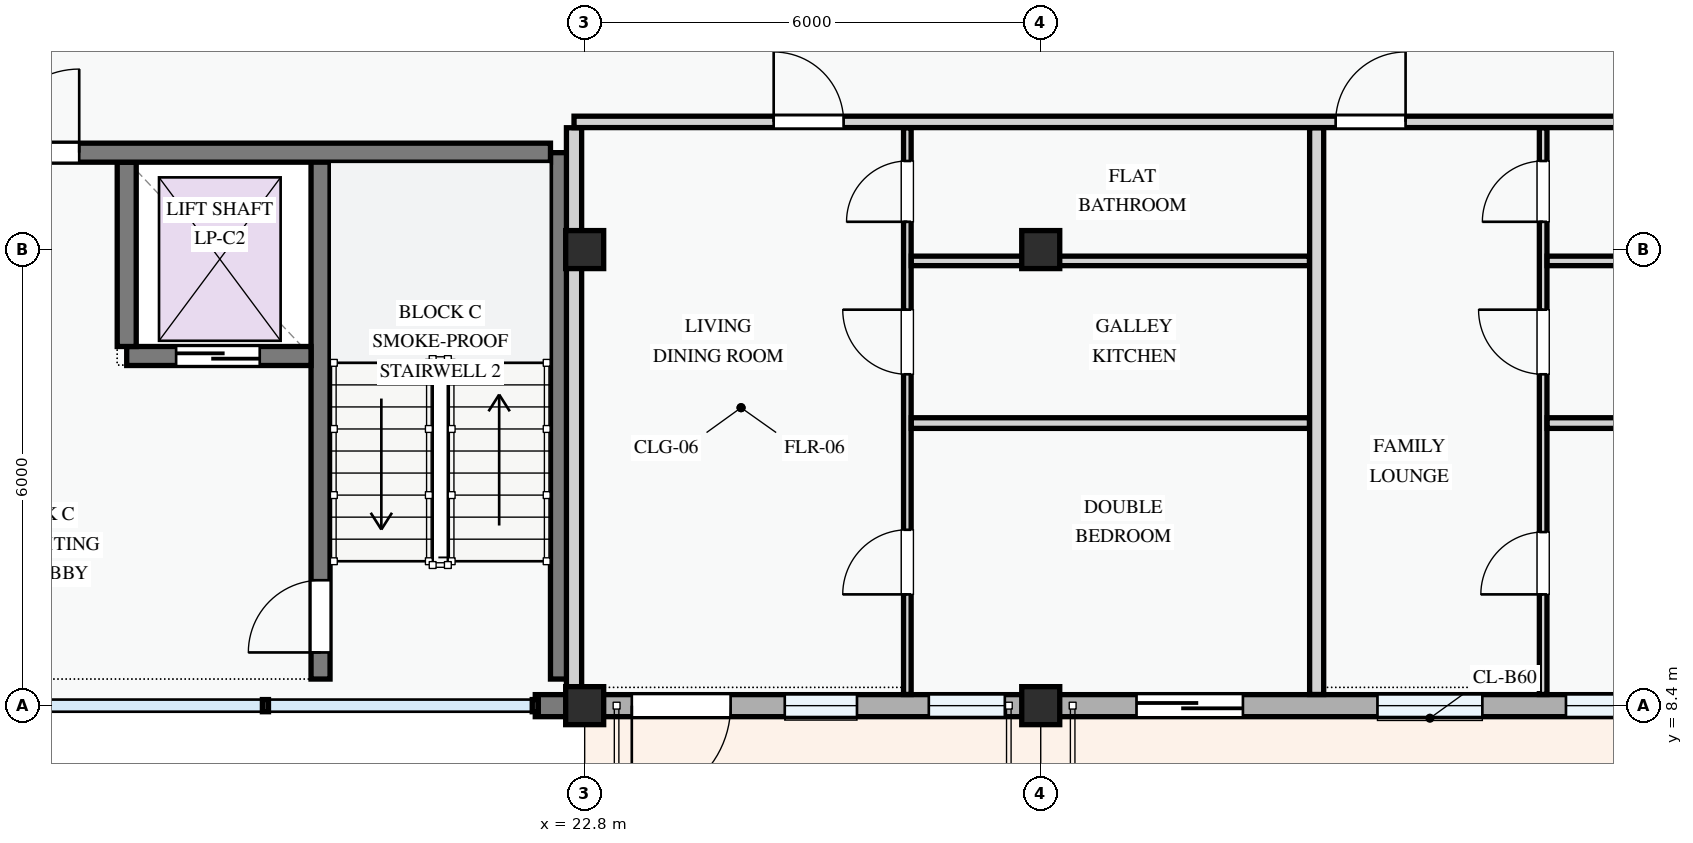
"""IFC4 building model, lengths in metres.
Left out: names, types, materials, properties, quantities, classifications, styles, units other than length and angle.
Written with IfcOpenShell. Run it as: python <this file> out.ifc"""

import sys

from ifc_helpers import new_model, si_unit, direction, frame, frame_2d, origin, origin_2d, place, context, subcontext, project, spatial, rectangle, extrude, element, fill, save


model = new_model("IFC4")
c1 = context("Model", 3, precision=1e-05, world=origin(), true_north=direction((0.0, 1.0)))
c2 = subcontext(c1, "Body", "Model", "MODEL_VIEW")
j1 = project(units=[si_unit("LENGTHUNIT", "METRE"), si_unit("PLANEANGLEUNIT", "RADIAN")], contexts=[c1])
p1 = place(None, origin())
s1 = spatial("IfcSite", under=j1, at=p1, CompositionType="ELEMENT")
p2 = place(p1, origin())
s2 = spatial("IfcBuilding", under=s1, at=p2, CompositionType="ELEMENT")
p3 = place(p2, frame((0.0, 0.0, 21.3)))
s3 = spatial("IfcBuildingStorey", under=s2, at=p3, CompositionType="ELEMENT", Elevation=21.3)
for number, where, z_axis, x_axis in (
    (1, (22.8, 8.4, 0.0), (0.0, 0.0, 1.0), (1.0, 0.0, 0.0)),
    (2, (22.8, 14.4, 0.0), (0.0, 0.0, 1.0), (1.0, 0.0, 0.0)),
    (3, (28.8, 8.4, 0.0), (0.0, 0.0, 1.0), (1.0, 0.0, 0.0)),
    (4, (28.8, 14.4, 0.0), (0.0, 0.0, 1.0), (1.0, 0.0, 0.0)),
):
    element("IfcColumn", number, at=place(p3, frame(where, z_axis=z_axis, x_axis=x_axis)), inside=s3, PredefinedType="COLUMN", context=c2, shape_type="SweptSolid", body=[
        extrude(rectangle(XDim=0.5, YDim=0.5, at=origin_2d()), origin(), (0.0, 0.0, 1.0), 3.3),
    ])
p4 = place(p3, frame((22.15, 8.4, 0.0), z_axis=(0.0, 0.0, 1.0), x_axis=(1.0, 0.0, 0.0)))
e5 = element("IfcWall", 5, at=p4, inside=s3, PredefinedType="STANDARD", context=c2, shape_type="SweptSolid", body=[
    extrude(rectangle(XDim=0.65, YDim=0.29, at=frame_2d((0.325, 0.0))), origin(), (0.0, 0.0, 1.0), 3.04),
])
p5 = place(p3, frame((22.8, 8.4, 0.0), z_axis=(0.0, 0.0, 1.0), x_axis=(1.0, 0.0, 0.0)))
e6 = element("IfcWall", 6, at=p5, inside=s3, PredefinedType="STANDARD", context=c2, shape_type="SweptSolid", body=[
    extrude(rectangle(XDim=6.0, YDim=0.29, at=frame_2d((3.0, 0.0))), origin(), (0.0, 0.0, 1.0), 2.475),
])
p6 = place(p5, frame((0.62, 0.0, 0.0)))
e7 = element("IfcOpeningElement", 7, at=p6, cuts=e6, PredefinedType="OPENING", context=c2, shape_type="SweptSolid", body=[
    extrude(rectangle(XDim=1.3, YDim=2.15, at=frame_2d((0.65, 1.075))), frame((0.0, 0.155, 0.0), z_axis=(0.0, -1.0, 0.0), x_axis=(1.0, 0.0, 0.0)), (0.0, 0.0, 1.0), 0.31),
])
p7 = place(p5, frame((2.633, 0.0, 0.78)))
e8 = element("IfcOpeningElement", 8, at=p7, cuts=e6, PredefinedType="OPENING", context=c2, shape_type="SweptSolid", body=[
    extrude(rectangle(XDim=0.95, YDim=1.15, at=frame_2d((0.475, 0.575))), frame((0.0, 0.155, 0.0), z_axis=(0.0, -1.0, 0.0), x_axis=(1.0, 0.0, 0.0)), (0.0, 0.0, 1.0), 0.31),
])
p8 = place(p5, frame((4.528, 0.0, 0.78)))
e9 = element("IfcOpeningElement", 9, at=p8, cuts=e6, PredefinedType="OPENING", context=c2, shape_type="SweptSolid", body=[
    extrude(rectangle(XDim=1.0, YDim=1.25, at=frame_2d((0.5, 0.625))), frame((0.0, 0.155, 0.0), z_axis=(0.0, -1.0, 0.0), x_axis=(1.0, 0.0, 0.0)), (0.0, 0.0, 1.0), 0.31),
])
p9 = place(p3, frame((28.8, 8.4, 0.0), z_axis=(0.0, 0.0, 1.0), x_axis=(1.0, 0.0, 0.0)))
e10 = element("IfcWall", 10, at=p9, inside=s3, PredefinedType="STANDARD", context=c2, shape_type="SweptSolid", body=[
    extrude(rectangle(XDim=8.4, YDim=0.29, at=frame_2d((4.2, 0.0))), origin(), (0.0, 0.0, 1.0), 2.375),
])
p10 = place(p9, frame((1.26, 0.0, 0.0)))
e11 = element("IfcOpeningElement", 11, at=p10, cuts=e10, PredefinedType="OPENING", context=c2, shape_type="SweptSolid", body=[
    extrude(rectangle(XDim=1.4, YDim=2.2, at=frame_2d((0.7, 1.1))), frame((0.0, 0.155, 0.0), z_axis=(0.0, -1.0, 0.0), x_axis=(1.0, 0.0, 0.0)), (0.0, 0.0, 1.0), 0.31),
])
p11 = place(p9, frame((4.43, 0.0, 0.78)))
e12 = element("IfcOpeningElement", 12, at=p11, cuts=e10, PredefinedType="OPENING", context=c2, shape_type="SweptSolid", body=[
    extrude(rectangle(XDim=1.38, YDim=1.48, at=frame_2d((0.69, 0.74))), frame((0.0, 0.155, 0.0), z_axis=(0.0, -1.0, 0.0), x_axis=(1.0, 0.0, 0.0)), (0.0, 0.0, 1.0), 0.31),
])
p12 = place(p9, frame((6.91, 0.0, 0.78)))
e13 = element("IfcOpeningElement", 13, at=p12, cuts=e10, PredefinedType="OPENING", context=c2, shape_type="SweptSolid", body=[
    extrude(rectangle(XDim=1.0, YDim=1.25, at=frame_2d((0.5, 0.625))), frame((0.0, 0.155, 0.0), z_axis=(0.0, -1.0, 0.0), x_axis=(1.0, 0.0, 0.0)), (0.0, 0.0, 1.0), 0.31),
])
p13 = place(p3, frame((22.475, 8.75, 0.0), z_axis=(0.0, 0.0, 1.0), x_axis=(0.0, 1.0, 0.0)))
e14 = element("IfcWall", 14, at=p13, inside=s3, PredefinedType="SHEAR", context=c2, shape_type="SweptSolid", body=[
    extrude(rectangle(XDim=6.925, YDim=0.25, at=frame_2d((3.462, 0.0))), origin(), (0.0, 0.0, 1.0), 3.0),
])
p14 = place(p3, frame((19.325, 8.75, 0.0), z_axis=(0.0, 0.0, 1.0), x_axis=(0.0, 1.0, 0.0)))
e15 = element("IfcWall", 15, at=p14, inside=s3, PredefinedType="SHEAR", context=c2, shape_type="SweptSolid", body=[
    extrude(rectangle(XDim=6.925, YDim=0.25, at=frame_2d((3.462, 0.0))), origin(), (0.0, 0.0, 1.0), 3.0),
])
p15 = place(p14, frame((0.35, 0.0, 0.0)))
e16 = element("IfcOpeningElement", 16, at=p15, cuts=e15, PredefinedType="OPENING", context=c2, shape_type="SweptSolid", body=[
    extrude(rectangle(XDim=0.95, YDim=2.1, at=frame_2d((0.475, 1.05))), frame((0.0, 0.135, 0.0), z_axis=(0.0, -1.0, 0.0), x_axis=(1.0, 0.0, 0.0)), (0.0, 0.0, 1.0), 0.27),
])
p16 = place(p3, frame((16.775, 13.0, 0.0), z_axis=(0.0, 0.0, 1.0), x_axis=(1.0, 0.0, 0.0)))
e17 = element("IfcWall", 17, at=p16, inside=s3, PredefinedType="SHEAR", context=c2, shape_type="SweptSolid", body=[
    extrude(rectangle(XDim=2.425, YDim=0.25, at=frame_2d((1.212, 0.0))), origin(), (0.0, 0.0, 1.0), 3.0),
])
p17 = place(p16, frame((0.65, 0.0, 0.0)))
e18 = element("IfcOpeningElement", 18, at=p17, cuts=e17, PredefinedType="OPENING", context=c2, shape_type="SweptSolid", body=[
    extrude(rectangle(XDim=1.1, YDim=2.15, at=frame_2d((0.55, 1.075))), frame((0.0, 0.135, 0.0), z_axis=(0.0, -1.0, 0.0), x_axis=(1.0, 0.0, 0.0)), (0.0, 0.0, 1.0), 0.27),
])
p18 = place(p3, frame((16.775, 13.125, 0.0), z_axis=(0.0, 0.0, 1.0), x_axis=(0.0, 1.0, 0.0)))
e19 = element("IfcWall", 19, at=p18, inside=s3, PredefinedType="SHEAR", context=c2, shape_type="SweptSolid", body=[
    extrude(rectangle(XDim=2.425, YDim=0.25, at=frame_2d((1.212, 0.0))), origin(), (0.0, 0.0, 1.0), 3.0),
])
p19 = place(p3, frame((8.85, 15.675, 0.0), z_axis=(0.0, 0.0, 1.0), x_axis=(1.0, 0.0, 0.0)))
e20 = element("IfcWall", 20, at=p19, inside=s3, PredefinedType="SHEAR", context=c2, shape_type="SweptSolid", body=[
    extrude(rectangle(XDim=13.5, YDim=0.25, at=frame_2d((6.75, 0.0))), origin(), (0.0, 0.0, 1.0), 3.0),
])
p20 = place(p19, frame((6.2, 0.0, 0.0)))
e21 = element("IfcOpeningElement", 21, at=p20, cuts=e20, PredefinedType="OPENING", context=c2, shape_type="SweptSolid", body=[
    extrude(rectangle(XDim=1.1, YDim=2.15, at=frame_2d((0.55, 1.075))), frame((0.0, 0.135, 0.0), z_axis=(0.0, -1.0, 0.0), x_axis=(1.0, 0.0, 0.0)), (0.0, 0.0, 1.0), 0.27),
])
p21 = place(p3, frame((27.045, 8.547, 0.0), z_axis=(0.0, 0.0, 1.0), x_axis=(0.0, 1.0, 0.0)))
e22 = element("IfcWall", 22, at=p21, inside=s3, PredefinedType="PARTITIONING", context=c2, shape_type="SweptSolid", body=[
    extrude(rectangle(XDim=7.456, YDim=0.1, at=frame_2d((3.728, 0.0))), origin(), (0.0, 0.0, 1.0), 3.0),
])
p22 = place(p21, frame((1.317, 0.0, 0.0)))
e23 = element("IfcOpeningElement", 23, at=p22, cuts=e22, PredefinedType="OPENING", context=c2, shape_type="SweptSolid", body=[
    extrude(rectangle(XDim=0.85, YDim=2.1, at=frame_2d((0.425, 1.05))), frame((0.0, 0.06, 0.0), z_axis=(0.0, -1.0, 0.0), x_axis=(1.0, 0.0, 0.0)), (0.0, 0.0, 1.0), 0.12),
])
p23 = place(p21, frame((4.212, 0.0, 0.0)))
e24 = element("IfcOpeningElement", 24, at=p23, cuts=e22, PredefinedType="OPENING", context=c2, shape_type="SweptSolid", body=[
    extrude(rectangle(XDim=0.85, YDim=2.1, at=frame_2d((0.425, 1.05))), frame((0.0, 0.06, 0.0), z_axis=(0.0, -1.0, 0.0), x_axis=(1.0, 0.0, 0.0)), (0.0, 0.0, 1.0), 0.12),
])
p24 = place(p21, frame((6.219, 0.0, 0.0)))
e25 = element("IfcOpeningElement", 25, at=p24, cuts=e22, PredefinedType="OPENING", context=c2, shape_type="SweptSolid", body=[
    extrude(rectangle(XDim=0.8, YDim=2.1, at=frame_2d((0.4, 1.05))), frame((0.0, 0.06, 0.0), z_axis=(0.0, -1.0, 0.0), x_axis=(1.0, 0.0, 0.0)), (0.0, 0.0, 1.0), 0.12),
])
p25 = place(p3, frame((27.097, 12.118, 0.0), z_axis=(0.0, 0.0, 1.0), x_axis=(1.0, 0.0, 0.0)))
e26 = element("IfcWall", 26, at=p25, inside=s3, PredefinedType="PARTITIONING", context=c2, shape_type="SweptSolid", body=[
    extrude(rectangle(XDim=5.239, YDim=0.14, at=frame_2d((2.619, 0.0))), origin(), (0.0, 0.0, 1.0), 3.0),
])
p26 = place(p3, frame((27.097, 14.251, 0.0), z_axis=(0.0, 0.0, 1.0), x_axis=(1.0, 0.0, 0.0)))
e27 = element("IfcWall", 27, at=p26, inside=s3, PredefinedType="PARTITIONING", context=c2, shape_type="SweptSolid", body=[
    extrude(rectangle(XDim=5.239, YDim=0.125, at=frame_2d((2.619, 0.0))), origin(), (0.0, 0.0, 1.0), 2.375),
])
p27 = place(p3, frame((22.66, 8.547, 0.0), z_axis=(0.0, 0.0, 1.0), x_axis=(0.0, 1.0, 0.0)))
e28 = element("IfcWall", 28, at=p27, inside=s3, PredefinedType="PARTITIONING", context=c2, shape_type="SweptSolid", body=[
    extrude(rectangle(XDim=7.456, YDim=0.2, at=frame_2d((3.728, 0.0))), origin(), (0.0, 0.0, 1.0), 2.425),
])
p28 = place(p3, frame((35.41, 8.547, 0.0), z_axis=(0.0, 0.0, 1.0), x_axis=(0.0, 1.0, 0.0)))
e29 = element("IfcWall", 29, at=p28, inside=s3, PredefinedType="PARTITIONING", context=c2, shape_type="SweptSolid", body=[
    extrude(rectangle(XDim=7.456, YDim=0.1, at=frame_2d((3.728, 0.0))), origin(), (0.0, 0.0, 1.0), 3.0),
])
p29 = place(p28, frame((1.317, 0.0, 0.0)))
e30 = element("IfcOpeningElement", 30, at=p29, cuts=e29, PredefinedType="OPENING", context=c2, shape_type="SweptSolid", body=[
    extrude(rectangle(XDim=0.82, YDim=2.08, at=frame_2d((0.41, 1.04))), frame((0.0, 0.06, 0.0), z_axis=(0.0, -1.0, 0.0), x_axis=(1.0, 0.0, 0.0)), (0.0, 0.0, 1.0), 0.12),
])
p30 = place(p28, frame((4.212, 0.0, 0.0)))
e31 = element("IfcOpeningElement", 31, at=p30, cuts=e29, PredefinedType="OPENING", context=c2, shape_type="SweptSolid", body=[
    extrude(rectangle(XDim=0.85, YDim=2.1, at=frame_2d((0.425, 1.05))), frame((0.0, 0.06, 0.0), z_axis=(0.0, -1.0, 0.0), x_axis=(1.0, 0.0, 0.0)), (0.0, 0.0, 1.0), 0.12),
])
p31 = place(p28, frame((6.219, 0.0, 0.0)))
e32 = element("IfcOpeningElement", 32, at=p31, cuts=e29, PredefinedType="OPENING", context=c2, shape_type="SweptSolid", body=[
    extrude(rectangle(XDim=0.8, YDim=2.1, at=frame_2d((0.4, 1.05))), frame((0.0, 0.06, 0.0), z_axis=(0.0, -1.0, 0.0), x_axis=(1.0, 0.0, 0.0)), (0.0, 0.0, 1.0), 0.12),
])
p32 = place(p3, frame((35.462, 12.118, 0.0), z_axis=(0.0, 0.0, 1.0), x_axis=(1.0, 0.0, 0.0)))
e33 = element("IfcWall", 33, at=p32, inside=s3, PredefinedType="PARTITIONING", context=c2, shape_type="SweptSolid", body=[
    extrude(rectangle(XDim=5.816, YDim=0.14, at=frame_2d((2.908, 0.0))), origin(), (0.0, 0.0, 1.0), 3.0),
])
p33 = place(p3, frame((35.462, 14.251, 0.0), z_axis=(0.0, 0.0, 1.0), x_axis=(1.0, 0.0, 0.0)))
e34 = element("IfcWall", 34, at=p33, inside=s3, PredefinedType="PARTITIONING", context=c2, shape_type="SweptSolid", body=[
    extrude(rectangle(XDim=5.816, YDim=0.125, at=frame_2d((2.908, 0.0))), origin(), (0.0, 0.0, 1.0), 2.375),
])
p34 = place(p3, frame((32.43, 8.547, 0.0), z_axis=(0.0, 0.0, 1.0), x_axis=(0.0, 1.0, 0.0)))
e35 = element("IfcWall", 35, at=p34, inside=s3, PredefinedType="PARTITIONING", context=c2, shape_type="SweptSolid", body=[
    extrude(rectangle(XDim=7.456, YDim=0.185, at=frame_2d((3.728, 0.0))), origin(), (0.0, 0.0, 1.0), 3.0),
])
p35 = place(p3, frame((22.66, 16.08, 0.0), z_axis=(0.0, 0.0, 1.0), x_axis=(1.0, 0.0, 0.0)))
e36 = element("IfcWall", 36, at=p35, inside=s3, PredefinedType="PARTITIONING", context=c2, shape_type="SweptSolid", body=[
    extrude(rectangle(XDim=34.793, YDim=0.15, at=frame_2d((17.396, 0.0))), origin(), (0.0, 0.0, 1.0), 3.0),
])
p36 = place(p35, frame((2.627, 0.0, 0.0)))
e37 = element("IfcOpeningElement", 37, at=p36, cuts=e36, PredefinedType="OPENING", context=c2, shape_type="SweptSolid", body=[
    extrude(rectangle(XDim=0.92, YDim=2.1, at=frame_2d((0.46, 1.05))), frame((0.0, 0.085, 0.0), z_axis=(0.0, -1.0, 0.0), x_axis=(1.0, 0.0, 0.0)), (0.0, 0.0, 1.0), 0.17),
])
p37 = place(p35, frame((10.02, 0.0, 0.0)))
e38 = element("IfcOpeningElement", 38, at=p37, cuts=e36, PredefinedType="OPENING", context=c2, shape_type="SweptSolid", body=[
    extrude(rectangle(XDim=0.92, YDim=2.1, at=frame_2d((0.46, 1.05))), frame((0.0, 0.085, 0.0), z_axis=(0.0, -1.0, 0.0), x_axis=(1.0, 0.0, 0.0)), (0.0, 0.0, 1.0), 0.17),
])
p38 = place(p35, frame((24.355, 0.0, 0.0)))
e39 = element("IfcOpeningElement", 39, at=p38, cuts=e36, PredefinedType="OPENING", context=c2, shape_type="SweptSolid", body=[
    extrude(rectangle(XDim=0.92, YDim=2.1, at=frame_2d((0.46, 1.05))), frame((0.0, 0.085, 0.0), z_axis=(0.0, -1.0, 0.0), x_axis=(1.0, 0.0, 0.0)), (0.0, 0.0, 1.0), 0.17),
])
p39 = place(p6, frame((1.3, 0.0, 0.0), z_axis=(0.0, 0.0, 1.0), x_axis=(-1.0, 0.0, 0.0)))
e40 = element("IfcDoor", 40, at=p39, inside=s3, OperationType="SINGLE_SWING_RIGHT", PredefinedType="DOOR", context=c2, shape_type="SweptSolid", body=[
    extrude(rectangle(XDim=1.3, YDim=2.15, at=frame_2d((0.65, 1.075))), frame((0.0, 0.025, 0.0), z_axis=(0.0, -1.0, 0.0), x_axis=(1.0, 0.0, 0.0)), (0.0, 0.0, 1.0), 0.05),
])
fill(e7, e40)
p40 = place(p7, origin())
e41 = element("IfcWindow", 41, at=p40, inside=s3, PartitioningType="SINGLE_PANEL", PredefinedType="WINDOW", context=c2, shape_type="SweptSolid", body=[
    extrude(rectangle(XDim=0.95, YDim=1.15, at=frame_2d((0.475, 0.575))), frame((0.0, 0.03, 0.0), z_axis=(0.0, -1.0, 0.0), x_axis=(1.0, 0.0, 0.0)), (0.0, 0.0, 1.0), 0.06),
])
fill(e8, e41)
p41 = place(p8, origin())
e42 = element("IfcWindow", 42, at=p41, inside=s3, PartitioningType="SINGLE_PANEL", PredefinedType="WINDOW", context=c2, shape_type="SweptSolid", body=[
    extrude(rectangle(XDim=1.0, YDim=1.25, at=frame_2d((0.5, 0.625))), frame((0.0, 0.03, 0.0), z_axis=(0.0, -1.0, 0.0), x_axis=(1.0, 0.0, 0.0)), (0.0, 0.0, 1.0), 0.06),
])
fill(e9, e42)
p42 = place(p10, frame((1.4, 0.0, 0.0), z_axis=(0.0, 0.0, 1.0), x_axis=(-1.0, 0.0, 0.0)))
e43 = element("IfcDoor", 43, at=p42, inside=s3, OperationType="SLIDING_TO_LEFT", PredefinedType="DOOR", context=c2, shape_type="SweptSolid", body=[
    extrude(rectangle(XDim=1.4, YDim=2.2, at=frame_2d((0.7, 1.1))), frame((0.0, 0.025, 0.0), z_axis=(0.0, -1.0, 0.0), x_axis=(1.0, 0.0, 0.0)), (0.0, 0.0, 1.0), 0.05),
])
fill(e11, e43)
p43 = place(p11, origin())
e44 = element("IfcWindow", 44, at=p43, inside=s3, PartitioningType="SINGLE_PANEL", PredefinedType="WINDOW", context=c2, shape_type="SweptSolid", body=[
    extrude(rectangle(XDim=1.38, YDim=1.48, at=frame_2d((0.69, 0.74))), frame((0.0, 0.03, 0.0), z_axis=(0.0, -1.0, 0.0), x_axis=(1.0, 0.0, 0.0)), (0.0, 0.0, 1.0), 0.06),
])
fill(e12, e44)
p44 = place(p12, origin())
e45 = element("IfcWindow", 45, at=p44, inside=s3, PartitioningType="SINGLE_PANEL", PredefinedType="WINDOW", context=c2, shape_type="SweptSolid", body=[
    extrude(rectangle(XDim=1.0, YDim=1.25, at=frame_2d((0.5, 0.625))), frame((0.0, 0.03, 0.0), z_axis=(0.0, -1.0, 0.0), x_axis=(1.0, 0.0, 0.0)), (0.0, 0.0, 1.0), 0.06),
])
fill(e13, e45)
p45 = place(p15, origin())
e46 = element("IfcDoor", 46, at=p45, inside=s3, OperationType="SINGLE_SWING_LEFT", PredefinedType="DOOR", context=c2, shape_type="SweptSolid", body=[
    extrude(rectangle(XDim=0.95, YDim=2.1, at=frame_2d((0.475, 1.05))), frame((0.0, 0.025, 0.0), z_axis=(0.0, -1.0, 0.0), x_axis=(1.0, 0.0, 0.0)), (0.0, 0.0, 1.0), 0.05),
])
fill(e16, e46)
p46 = place(p17, origin())
e47 = element("IfcDoor", 47, at=p46, inside=s3, OperationType="SLIDING_TO_LEFT", PredefinedType="DOOR", context=c2, shape_type="SweptSolid", body=[
    extrude(rectangle(XDim=1.1, YDim=2.15, at=frame_2d((0.55, 1.075))), frame((0.0, 0.025, 0.0), z_axis=(0.0, -1.0, 0.0), x_axis=(1.0, 0.0, 0.0)), (0.0, 0.0, 1.0), 0.05),
])
fill(e18, e47)
p47 = place(p20, origin())
e48 = element("IfcDoor", 48, at=p47, inside=s3, OperationType="SINGLE_SWING_RIGHT", PredefinedType="DOOR", context=c2, shape_type="SweptSolid", body=[
    extrude(rectangle(XDim=1.1, YDim=2.15, at=frame_2d((0.55, 1.075))), frame((0.0, 0.025, 0.0), z_axis=(0.0, -1.0, 0.0), x_axis=(1.0, 0.0, 0.0)), (0.0, 0.0, 1.0), 0.05),
])
fill(e21, e48)
p48 = place(p22, origin())
e49 = element("IfcDoor", 49, at=p48, inside=s3, OperationType="SINGLE_SWING_LEFT", PredefinedType="DOOR", context=c2, shape_type="SweptSolid", body=[
    extrude(rectangle(XDim=0.85, YDim=2.1, at=frame_2d((0.425, 1.05))), frame((0.0, 0.025, 0.0), z_axis=(0.0, -1.0, 0.0), x_axis=(1.0, 0.0, 0.0)), (0.0, 0.0, 1.0), 0.05),
])
fill(e23, e49)
p49 = place(p23, origin())
e50 = element("IfcDoor", 50, at=p49, inside=s3, OperationType="SINGLE_SWING_RIGHT", PredefinedType="DOOR", context=c2, shape_type="SweptSolid", body=[
    extrude(rectangle(XDim=0.85, YDim=2.1, at=frame_2d((0.425, 1.05))), frame((0.0, 0.025, 0.0), z_axis=(0.0, -1.0, 0.0), x_axis=(1.0, 0.0, 0.0)), (0.0, 0.0, 1.0), 0.05),
])
fill(e24, e50)
p50 = place(p24, origin())
e51 = element("IfcDoor", 51, at=p50, inside=s3, OperationType="SINGLE_SWING_LEFT", PredefinedType="DOOR", context=c2, shape_type="SweptSolid", body=[
    extrude(rectangle(XDim=0.8, YDim=2.1, at=frame_2d((0.4, 1.05))), frame((0.0, 0.025, 0.0), z_axis=(0.0, -1.0, 0.0), x_axis=(1.0, 0.0, 0.0)), (0.0, 0.0, 1.0), 0.05),
])
fill(e25, e51)
p51 = place(p29, origin())
e52 = element("IfcDoor", 52, at=p51, inside=s3, OperationType="SINGLE_SWING_LEFT", PredefinedType="DOOR", context=c2, shape_type="SweptSolid", body=[
    extrude(rectangle(XDim=0.82, YDim=2.08, at=frame_2d((0.41, 1.04))), frame((0.0, 0.025, 0.0), z_axis=(0.0, -1.0, 0.0), x_axis=(1.0, 0.0, 0.0)), (0.0, 0.0, 1.0), 0.05),
])
fill(e30, e52)
p52 = place(p30, origin())
e53 = element("IfcDoor", 53, at=p52, inside=s3, OperationType="SINGLE_SWING_RIGHT", PredefinedType="DOOR", context=c2, shape_type="SweptSolid", body=[
    extrude(rectangle(XDim=0.85, YDim=2.1, at=frame_2d((0.425, 1.05))), frame((0.0, 0.025, 0.0), z_axis=(0.0, -1.0, 0.0), x_axis=(1.0, 0.0, 0.0)), (0.0, 0.0, 1.0), 0.05),
])
fill(e31, e53)
p53 = place(p31, origin())
e54 = element("IfcDoor", 54, at=p53, inside=s3, OperationType="SINGLE_SWING_LEFT", PredefinedType="DOOR", context=c2, shape_type="SweptSolid", body=[
    extrude(rectangle(XDim=0.8, YDim=2.1, at=frame_2d((0.4, 1.05))), frame((0.0, 0.025, 0.0), z_axis=(0.0, -1.0, 0.0), x_axis=(1.0, 0.0, 0.0)), (0.0, 0.0, 1.0), 0.05),
])
fill(e32, e54)
p54 = place(p36, origin())
e55 = element("IfcDoor", 55, at=p54, inside=s3, OperationType="SINGLE_SWING_LEFT", PredefinedType="DOOR", context=c2, shape_type="SweptSolid", body=[
    extrude(rectangle(XDim=0.92, YDim=2.1, at=frame_2d((0.46, 1.05))), frame((0.0, 0.025, 0.0), z_axis=(0.0, -1.0, 0.0), x_axis=(1.0, 0.0, 0.0)), (0.0, 0.0, 1.0), 0.05),
])
fill(e37, e55)
p55 = place(p37, origin())
e56 = element("IfcDoor", 56, at=p55, inside=s3, OperationType="SINGLE_SWING_RIGHT", PredefinedType="DOOR", context=c2, shape_type="SweptSolid", body=[
    extrude(rectangle(XDim=0.92, YDim=2.1, at=frame_2d((0.46, 1.05))), frame((0.0, 0.025, 0.0), z_axis=(0.0, -1.0, 0.0), x_axis=(1.0, 0.0, 0.0)), (0.0, 0.0, 1.0), 0.05),
])
fill(e38, e56)
save(model, sys.argv[1])
